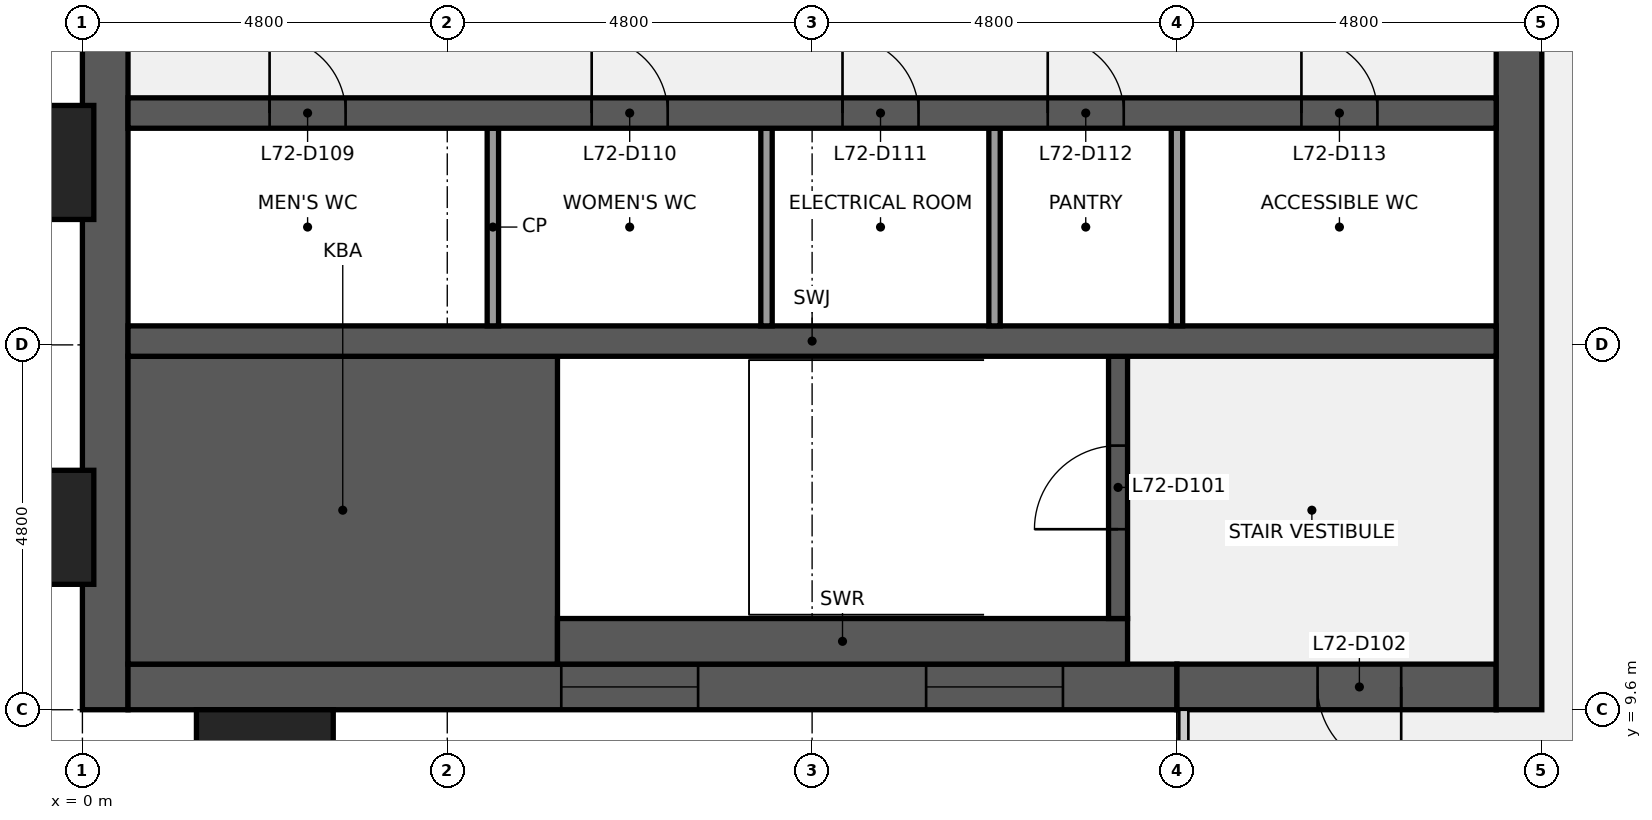
"""IFC4 building model, lengths in metres.
Left out: names, types, materials, properties, quantities, classifications, styles, units other than length and angle.
Written with IfcOpenShell. Run it as: python <this file> out.ifc"""

import sys

from ifc_helpers import new_model, si_unit, direction, frame, frame_2d, origin, origin_2d, place, context, subcontext, project, spatial, rectangle, extrude, element, fill, save


model = new_model("IFC4")
c1 = context("Model", 3, precision=1e-05, world=origin(), true_north=direction((0.0, 1.0)))
c2 = subcontext(c1, "Body", "Model", "MODEL_VIEW")
j1 = project(units=[si_unit("LENGTHUNIT", "METRE"), si_unit("PLANEANGLEUNIT", "RADIAN")], contexts=[c1])
p1 = place(None, origin())
s1 = spatial("IfcSite", under=j1, at=p1, CompositionType="ELEMENT")
p2 = place(p1, origin())
s2 = spatial("IfcBuilding", under=s1, at=p2, CompositionType="ELEMENT")
p3 = place(p2, frame((0.0, 0.0, 326.3)))
s3 = spatial("IfcBuildingStorey", under=s2, at=p3, CompositionType="ELEMENT", Elevation=326.3)
p4 = place(p3, frame((0.3, 9.6, 0.0), z_axis=(0.0, 0.0, 1.0), x_axis=(0.0, 1.0, 0.0)))
e1 = element("IfcWall", 1, at=p4, inside=s3, PredefinedType="SHEAR", context=c2, shape_type="SweptSolid", body=[
    extrude(rectangle(XDim=28.8, YDim=0.6, at=frame_2d((14.4, 0.0))), origin(), (0.0, 0.0, 1.0), 3.84),
])
p5 = place(p4, frame((8.85, 0.0, 0.9)))
e2 = element("IfcOpeningElement", 2, at=p5, cuts=e1, PredefinedType="OPENING", context=c2, shape_type="SweptSolid", body=[
    extrude(rectangle(XDim=1.5, YDim=1.5, at=frame_2d((0.75, 0.75))), frame((0.0, 0.31, 0.0), z_axis=(0.0, -1.0, 0.0), x_axis=(1.0, 0.0, 0.0)), (0.0, 0.0, 1.0), 0.62),
])
p6 = place(p4, frame((18.45, 0.0, 0.9)))
e3 = element("IfcOpeningElement", 3, at=p6, cuts=e1, PredefinedType="OPENING", context=c2, shape_type="SweptSolid", body=[
    extrude(rectangle(XDim=1.5, YDim=1.5, at=frame_2d((0.75, 0.75))), frame((0.0, 0.31, 0.0), z_axis=(0.0, -1.0, 0.0), x_axis=(1.0, 0.0, 0.0)), (0.0, 0.0, 1.0), 0.62),
])
p7 = place(p3, frame((14.4, 9.9, 0.0), z_axis=(0.0, 0.0, 1.0), x_axis=(-1.0, 0.0, 0.0)))
e4 = element("IfcWall", 4, at=p7, inside=s3, PredefinedType="SHEAR", context=c2, shape_type="SweptSolid", body=[
    extrude(rectangle(XDim=13.8, YDim=0.6, at=frame_2d((6.9, 0.0))), origin(), (0.0, 0.0, 1.0), 3.84),
])
p8 = place(p7, frame((6.3, 0.0, 0.9)))
e5 = element("IfcOpeningElement", 5, at=p8, cuts=e4, PredefinedType="OPENING", context=c2, shape_type="SweptSolid", body=[
    extrude(rectangle(XDim=1.8, YDim=1.5, at=frame_2d((0.9, 0.75))), frame((0.0, 0.31, 0.0), z_axis=(0.0, -1.0, 0.0), x_axis=(1.0, 0.0, 0.0)), (0.0, 0.0, 1.0), 0.62),
])
p9 = place(p7, frame((1.5, 0.0, 0.9)))
e6 = element("IfcOpeningElement", 6, at=p9, cuts=e4, PredefinedType="OPENING", context=c2, shape_type="SweptSolid", body=[
    extrude(rectangle(XDim=1.8, YDim=1.5, at=frame_2d((0.9, 0.75))), frame((0.0, 0.31, 0.0), z_axis=(0.0, -1.0, 0.0), x_axis=(1.0, 0.0, 0.0)), (0.0, 0.0, 1.0), 0.62),
])
p10 = place(p3, frame((18.6, 9.9, 0.0), z_axis=(0.0, 0.0, 1.0), x_axis=(-1.0, 0.0, 0.0)))
e7 = element("IfcWall", 7, at=p10, inside=s3, PredefinedType="SHEAR", context=c2, shape_type="SweptSolid", body=[
    extrude(rectangle(XDim=4.2, YDim=0.6, at=frame_2d((2.1, 0.0))), origin(), (0.0, 0.0, 1.0), 3.84),
])
p11 = place(p10, frame((1.25, 0.0, 0.0)))
e8 = element("IfcOpeningElement", 8, at=p11, cuts=e7, PredefinedType="OPENING", context=c2, shape_type="SweptSolid", body=[
    extrude(rectangle(XDim=1.1, YDim=2.1, at=frame_2d((0.55, 1.05))), frame((0.0, 0.31, 0.0), z_axis=(0.0, -1.0, 0.0), x_axis=(1.0, 0.0, 0.0)), (0.0, 0.0, 1.0), 0.62),
])
p12 = place(p3, frame((18.9, 38.4, 0.0), z_axis=(0.0, 0.0, 1.0), x_axis=(0.0, -1.0, 0.0)))
e9 = element("IfcWall", 9, at=p12, inside=s3, PredefinedType="SHEAR", context=c2, shape_type="SweptSolid", body=[
    extrude(rectangle(XDim=28.8, YDim=0.6, at=frame_2d((14.4, 0.0))), origin(), (0.0, 0.0, 1.0), 3.84),
])
p13 = place(p12, frame((18.3, 0.0, 0.0)))
e10 = element("IfcOpeningElement", 10, at=p13, cuts=e9, PredefinedType="OPENING", context=c2, shape_type="SweptSolid", body=[
    extrude(rectangle(XDim=1.8, YDim=2.1, at=frame_2d((0.9, 1.05))), frame((0.0, 0.31, 0.0), z_axis=(0.0, -1.0, 0.0), x_axis=(1.0, 0.0, 0.0)), (0.0, 0.0, 1.0), 0.62),
])
p14 = place(p12, frame((8.7, 0.0, 0.0)))
e11 = element("IfcOpeningElement", 11, at=p14, cuts=e9, PredefinedType="OPENING", context=c2, shape_type="SweptSolid", body=[
    extrude(rectangle(XDim=1.8, YDim=2.1, at=frame_2d((0.9, 1.05))), frame((0.0, 0.31, 0.0), z_axis=(0.0, -1.0, 0.0), x_axis=(1.0, 0.0, 0.0)), (0.0, 0.0, 1.0), 0.62),
])
p15 = place(p3, frame((0.6, 12.225, 0.0), z_axis=(0.0, 0.0, 1.0), x_axis=(1.0, 0.0, 0.0)))
e12 = element("IfcWall", 12, at=p15, inside=s3, PredefinedType="SHEAR", context=c2, shape_type="SweptSolid", body=[
    extrude(rectangle(XDim=5.65, YDim=4.05, at=frame_2d((2.825, 0.0))), origin(), (0.0, 0.0, 1.0), 3.84),
])
p16 = place(p3, frame((6.25, 10.5, 0.0), z_axis=(0.0, 0.0, 1.0), x_axis=(1.0, 0.0, 0.0)))
e13 = element("IfcWall", 13, at=p16, inside=s3, PredefinedType="SHEAR", context=c2, shape_type="SweptSolid", body=[
    extrude(rectangle(XDim=7.5, YDim=0.6, at=frame_2d((3.75, 0.0))), origin(), (0.0, 0.0, 1.0), 3.84),
])
p17 = place(p3, frame((13.625, 10.8, 0.0), z_axis=(0.0, 0.0, 1.0), x_axis=(0.0, 1.0, 0.0)))
e14 = element("IfcWall", 14, at=p17, inside=s3, PredefinedType="SHEAR", context=c2, shape_type="SweptSolid", body=[
    extrude(rectangle(XDim=3.45, YDim=0.25, at=frame_2d((1.725, 0.0))), origin(), (0.0, 0.0, 1.0), 3.84),
])
p18 = place(p17, frame((1.175, 0.0, 0.0)))
e15 = element("IfcOpeningElement", 15, at=p18, cuts=e14, PredefinedType="OPENING", context=c2, shape_type="SweptSolid", body=[
    extrude(rectangle(XDim=1.1, YDim=2.1, at=frame_2d((0.55, 1.05))), frame((0.0, 0.135, 0.0), z_axis=(0.0, -1.0, 0.0), x_axis=(1.0, 0.0, 0.0)), (0.0, 0.0, 1.0), 0.27),
])
p19 = place(p3, frame((0.6, 14.45, 0.0), z_axis=(0.0, 0.0, 1.0), x_axis=(1.0, 0.0, 0.0)))
e16 = element("IfcWall", 16, at=p19, inside=s3, PredefinedType="SHEAR", context=c2, shape_type="SweptSolid", body=[
    extrude(rectangle(XDim=18.0, YDim=0.4, at=frame_2d((9.0, 0.0))), origin(), (0.0, 0.0, 1.0), 3.84),
])
for number, where, z_axis, x_axis in (
    (17, (5.4, 14.65, 0.0), (0.0, 0.0, 1.0), (0.0, 1.0, 0.0)),
    (18, (9.0, 14.65, 0.0), (0.0, 0.0, 1.0), (0.0, 1.0, 0.0)),
    (19, (12.0, 14.65, 0.0), (0.0, 0.0, 1.0), (0.0, 1.0, 0.0)),
    (20, (14.4, 14.65, 0.0), (0.0, 0.0, 1.0), (0.0, 1.0, 0.0)),
):
    element("IfcWall", number, at=place(p3, frame(where, z_axis=z_axis, x_axis=x_axis)), inside=s3, PredefinedType="PARTITIONING", context=c2, shape_type="SweptSolid", body=[
        extrude(rectangle(XDim=2.6, YDim=0.15, at=frame_2d((1.3, 0.0))), origin(), (0.0, 0.0, 1.0), 3.84),
    ])
p20 = place(p3, frame((0.6, 17.45, 0.0), z_axis=(0.0, 0.0, 1.0), x_axis=(1.0, 0.0, 0.0)))
e21 = element("IfcWall", 21, at=p20, inside=s3, PredefinedType="SHEAR", context=c2, shape_type="SweptSolid", body=[
    extrude(rectangle(XDim=18.0, YDim=0.4, at=frame_2d((9.0, 0.0))), origin(), (0.0, 0.0, 1.0), 3.84),
])
p21 = place(p20, frame((1.863, 0.0, 0.0)))
e22 = element("IfcOpeningElement", 22, at=p21, cuts=e21, PredefinedType="OPENING", context=c2, shape_type="SweptSolid", body=[
    extrude(rectangle(XDim=1.0, YDim=2.1, at=frame_2d((0.5, 1.05))), frame((0.0, 0.21, 0.0), z_axis=(0.0, -1.0, 0.0), x_axis=(1.0, 0.0, 0.0)), (0.0, 0.0, 1.0), 0.42),
])
p22 = place(p20, frame((6.1, 0.0, 0.0)))
e23 = element("IfcOpeningElement", 23, at=p22, cuts=e21, PredefinedType="OPENING", context=c2, shape_type="SweptSolid", body=[
    extrude(rectangle(XDim=1.0, YDim=2.1, at=frame_2d((0.5, 1.05))), frame((0.0, 0.21, 0.0), z_axis=(0.0, -1.0, 0.0), x_axis=(1.0, 0.0, 0.0)), (0.0, 0.0, 1.0), 0.42),
])
p23 = place(p20, frame((9.4, 0.0, 0.0)))
e24 = element("IfcOpeningElement", 24, at=p23, cuts=e21, PredefinedType="OPENING", context=c2, shape_type="SweptSolid", body=[
    extrude(rectangle(XDim=1.0, YDim=2.1, at=frame_2d((0.5, 1.05))), frame((0.0, 0.21, 0.0), z_axis=(0.0, -1.0, 0.0), x_axis=(1.0, 0.0, 0.0)), (0.0, 0.0, 1.0), 0.42),
])
p24 = place(p20, frame((12.1, 0.0, 0.0)))
e25 = element("IfcOpeningElement", 25, at=p24, cuts=e21, PredefinedType="OPENING", context=c2, shape_type="SweptSolid", body=[
    extrude(rectangle(XDim=1.0, YDim=2.1, at=frame_2d((0.5, 1.05))), frame((0.0, 0.21, 0.0), z_axis=(0.0, -1.0, 0.0), x_axis=(1.0, 0.0, 0.0)), (0.0, 0.0, 1.0), 0.42),
])
p25 = place(p20, frame((15.438, 0.0, 0.0)))
e26 = element("IfcOpeningElement", 26, at=p25, cuts=e21, PredefinedType="OPENING", context=c2, shape_type="SweptSolid", body=[
    extrude(rectangle(XDim=1.0, YDim=2.1, at=frame_2d((0.5, 1.05))), frame((0.0, 0.21, 0.0), z_axis=(0.0, -1.0, 0.0), x_axis=(1.0, 0.0, 0.0)), (0.0, 0.0, 1.0), 0.42),
])
for number, where, z_axis, x_axis in (
    (27, (-0.75, 12.0, 0.0), (0.0, 0.0, 1.0), (0.0, 1.0, 0.0)),
    (28, (-0.75, 16.8, 0.0), (0.0, 0.0, 1.0), (0.0, 1.0, 0.0)),
    (29, (2.4, 8.85, 0.0), (0.0, 0.0, 1.0), (1.0, 0.0, 0.0)),
):
    element("IfcColumn", number, at=place(p3, frame(where, z_axis=z_axis, x_axis=x_axis)), inside=s3, PredefinedType="PILASTER", context=c2, shape_type="SweptSolid", body=[
        extrude(rectangle(XDim=1.8, YDim=1.5, at=origin_2d()), origin(), (0.0, 0.0, 1.0), 4.0),
    ])
p26 = place(p18, origin())
e30 = element("IfcDoor", 30, at=p26, inside=s3, OperationType="SINGLE_SWING_LEFT", PredefinedType="DOOR", context=c2, shape_type="SweptSolid", body=[
    extrude(rectangle(XDim=1.1, YDim=2.1, at=frame_2d((0.55, 1.05))), frame((0.0, 0.025, 0.0), z_axis=(0.0, -1.0, 0.0), x_axis=(1.0, 0.0, 0.0)), (0.0, 0.0, 1.0), 0.05),
])
fill(e15, e30)
p27 = place(p11, origin())
e31 = element("IfcDoor", 31, at=p27, inside=s3, OperationType="SINGLE_SWING_LEFT", PredefinedType="DOOR", context=c2, shape_type="SweptSolid", body=[
    extrude(rectangle(XDim=1.1, YDim=2.1, at=frame_2d((0.55, 1.05))), frame((0.0, 0.025, 0.0), z_axis=(0.0, -1.0, 0.0), x_axis=(1.0, 0.0, 0.0)), (0.0, 0.0, 1.0), 0.05),
])
fill(e8, e31)
p28 = place(p21, origin())
e32 = element("IfcDoor", 32, at=p28, inside=s3, OperationType="SINGLE_SWING_LEFT", PredefinedType="DOOR", context=c2, shape_type="SweptSolid", body=[
    extrude(rectangle(XDim=1.0, YDim=2.1, at=frame_2d((0.5, 1.05))), frame((0.0, 0.025, 0.0), z_axis=(0.0, -1.0, 0.0), x_axis=(1.0, 0.0, 0.0)), (0.0, 0.0, 1.0), 0.05),
])
fill(e22, e32)
p29 = place(p22, origin())
e33 = element("IfcDoor", 33, at=p29, inside=s3, OperationType="SINGLE_SWING_LEFT", PredefinedType="DOOR", context=c2, shape_type="SweptSolid", body=[
    extrude(rectangle(XDim=1.0, YDim=2.1, at=frame_2d((0.5, 1.05))), frame((0.0, 0.025, 0.0), z_axis=(0.0, -1.0, 0.0), x_axis=(1.0, 0.0, 0.0)), (0.0, 0.0, 1.0), 0.05),
])
fill(e23, e33)
p30 = place(p23, origin())
e34 = element("IfcDoor", 34, at=p30, inside=s3, OperationType="SINGLE_SWING_LEFT", PredefinedType="DOOR", context=c2, shape_type="SweptSolid", body=[
    extrude(rectangle(XDim=1.0, YDim=2.1, at=frame_2d((0.5, 1.05))), frame((0.0, 0.025, 0.0), z_axis=(0.0, -1.0, 0.0), x_axis=(1.0, 0.0, 0.0)), (0.0, 0.0, 1.0), 0.05),
])
fill(e24, e34)
p31 = place(p24, origin())
e35 = element("IfcDoor", 35, at=p31, inside=s3, OperationType="SINGLE_SWING_LEFT", PredefinedType="DOOR", context=c2, shape_type="SweptSolid", body=[
    extrude(rectangle(XDim=1.0, YDim=2.1, at=frame_2d((0.5, 1.05))), frame((0.0, 0.025, 0.0), z_axis=(0.0, -1.0, 0.0), x_axis=(1.0, 0.0, 0.0)), (0.0, 0.0, 1.0), 0.05),
])
fill(e25, e35)
p32 = place(p25, origin())
e36 = element("IfcDoor", 36, at=p32, inside=s3, OperationType="SINGLE_SWING_LEFT", PredefinedType="DOOR", context=c2, shape_type="SweptSolid", body=[
    extrude(rectangle(XDim=1.0, YDim=2.1, at=frame_2d((0.5, 1.05))), frame((0.0, 0.025, 0.0), z_axis=(0.0, -1.0, 0.0), x_axis=(1.0, 0.0, 0.0)), (0.0, 0.0, 1.0), 0.05),
])
fill(e26, e36)
p33 = place(p8, origin())
e37 = element("IfcWindow", 37, at=p33, inside=s3, PartitioningType="SINGLE_PANEL", PredefinedType="WINDOW", context=c2, shape_type="SweptSolid", body=[
    extrude(rectangle(XDim=1.8, YDim=1.5, at=frame_2d((0.9, 0.75))), frame((0.0, 0.03, 0.0), z_axis=(0.0, -1.0, 0.0), x_axis=(1.0, 0.0, 0.0)), (0.0, 0.0, 1.0), 0.06),
])
fill(e5, e37)
p34 = place(p9, origin())
e38 = element("IfcWindow", 38, at=p34, inside=s3, PartitioningType="SINGLE_PANEL", PredefinedType="WINDOW", context=c2, shape_type="SweptSolid", body=[
    extrude(rectangle(XDim=1.8, YDim=1.5, at=frame_2d((0.9, 0.75))), frame((0.0, 0.03, 0.0), z_axis=(0.0, -1.0, 0.0), x_axis=(1.0, 0.0, 0.0)), (0.0, 0.0, 1.0), 0.06),
])
fill(e6, e38)
save(model, sys.argv[1])
